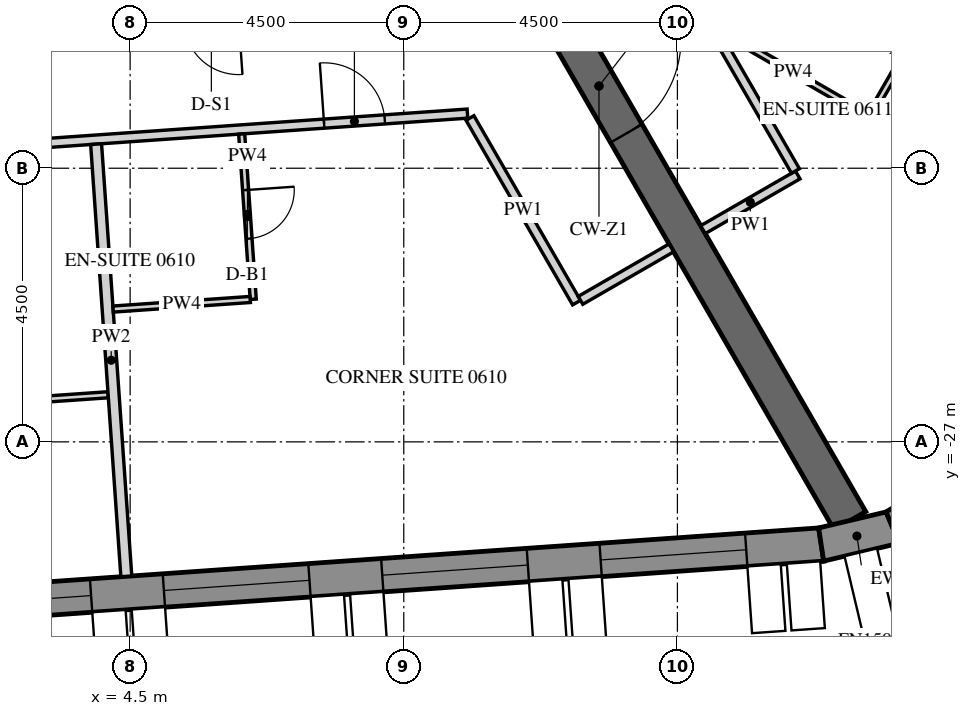
"""IFC4 building model, lengths in metres.
Left out: names, types, materials, properties, quantities, classifications, styles, units other than length and angle.
Written with IfcOpenShell. Run it as: python <this file> out.ifc"""

import sys

from ifc_helpers import new_model, si_unit, direction, frame, frame_2d, origin, place, context, subcontext, project, spatial, polyline, rectangle, outline, extrude, element, fill, save


model = new_model("IFC4")
c1 = context("Model", 3, precision=1e-05, world=origin(), true_north=direction((0.0, 1.0)))
c2 = subcontext(c1, "Body", "Model", "MODEL_VIEW")
j1 = project(units=[si_unit("LENGTHUNIT", "METRE"), si_unit("PLANEANGLEUNIT", "RADIAN")], contexts=[c1])
p1 = place(None, origin())
s1 = spatial("IfcSite", under=j1, at=p1, CompositionType="ELEMENT")
p2 = place(p1, origin())
s2 = spatial("IfcBuilding", under=s1, at=p2, CompositionType="ELEMENT")
p3 = place(p2, frame((0.0, 0.0, 92.1)))
s3 = spatial("IfcBuildingStorey", under=s2, at=p3, CompositionType="ELEMENT", Elevation=92.1)
p4 = place(p3, frame((-14.134, -30.786, -0.15), z_axis=(0.0, 0.0, 1.0), x_axis=(0.997564037441, 0.069756657061, 0.0)))
e1 = element("IfcWall", 1, at=p4, inside=s3, PredefinedType="SOLIDWALL", context=c2, shape_type="SweptSolid", body=[
    extrude(outline(polyline([(-0.026, -0.275), (30.094, -0.275), (30.049, 0.275), (0.026, 0.275), (-0.026, -0.275)])), origin(), (0.0, 0.0, 1.0), 3.9),
])
p5 = place(p4, frame((1.236, 0.0, 1.05)))
e2 = element("IfcOpeningElement", 2, at=p5, cuts=e1, PredefinedType="OPENING", context=c2, shape_type="SweptSolid", body=[
    extrude(rectangle(XDim=2.4, YDim=2.4, at=frame_2d((1.2, 1.2))), frame((0.0, 0.285, 0.0), z_axis=(0.0, -1.0, 0.0), x_axis=(1.0, 0.0, 0.0)), (0.0, 0.0, 1.0), 0.57),
])
p6 = place(p4, frame((4.835, 0.0, 1.05)))
e3 = element("IfcOpeningElement", 3, at=p6, cuts=e1, PredefinedType="OPENING", context=c2, shape_type="SweptSolid", body=[
    extrude(rectangle(XDim=2.4, YDim=2.4, at=frame_2d((1.2, 1.2))), frame((0.0, 0.285, 0.0), z_axis=(0.0, -1.0, 0.0), x_axis=(1.0, 0.0, 0.0)), (0.0, 0.0, 1.0), 0.57),
])
p7 = place(p4, frame((8.436, 0.0, 1.05)))
e4 = element("IfcOpeningElement", 4, at=p7, cuts=e1, PredefinedType="OPENING", context=c2, shape_type="SweptSolid", body=[
    extrude(rectangle(XDim=2.4, YDim=2.4, at=frame_2d((1.2, 1.2))), frame((0.0, 0.285, 0.0), z_axis=(0.0, -1.0, 0.0), x_axis=(1.0, 0.0, 0.0)), (0.0, 0.0, 1.0), 0.57),
])
p8 = place(p4, frame((12.035, 0.0, 1.05)))
e5 = element("IfcOpeningElement", 5, at=p8, cuts=e1, PredefinedType="OPENING", context=c2, shape_type="SweptSolid", body=[
    extrude(rectangle(XDim=2.4, YDim=2.4, at=frame_2d((1.2, 1.2))), frame((0.0, 0.285, 0.0), z_axis=(0.0, -1.0, 0.0), x_axis=(1.0, 0.0, 0.0)), (0.0, 0.0, 1.0), 0.57),
])
p9 = place(p4, frame((15.635, 0.0, 1.05)))
e6 = element("IfcOpeningElement", 6, at=p9, cuts=e1, PredefinedType="OPENING", context=c2, shape_type="SweptSolid", body=[
    extrude(rectangle(XDim=2.4, YDim=2.4, at=frame_2d((1.2, 1.2))), frame((0.0, 0.285, 0.0), z_axis=(0.0, -1.0, 0.0), x_axis=(1.0, 0.0, 0.0)), (0.0, 0.0, 1.0), 0.57),
])
p10 = place(p4, frame((19.236, 0.0, 1.05)))
e7 = element("IfcOpeningElement", 7, at=p10, cuts=e1, PredefinedType="OPENING", context=c2, shape_type="SweptSolid", body=[
    extrude(rectangle(XDim=2.4, YDim=2.4, at=frame_2d((1.2, 1.2))), frame((0.0, 0.285, 0.0), z_axis=(0.0, -1.0, 0.0), x_axis=(1.0, 0.0, 0.0)), (0.0, 0.0, 1.0), 0.57),
])
p11 = place(p4, frame((22.835, 0.0, 1.05)))
e8 = element("IfcOpeningElement", 8, at=p11, cuts=e1, PredefinedType="OPENING", context=c2, shape_type="SweptSolid", body=[
    extrude(rectangle(XDim=2.4, YDim=2.4, at=frame_2d((1.2, 1.2))), frame((0.0, 0.285, 0.0), z_axis=(0.0, -1.0, 0.0), x_axis=(1.0, 0.0, 0.0)), (0.0, 0.0, 1.0), 0.57),
])
p12 = place(p4, frame((26.436, 0.0, 1.05)))
e9 = element("IfcOpeningElement", 9, at=p12, cuts=e1, PredefinedType="OPENING", context=c2, shape_type="SweptSolid", body=[
    extrude(rectangle(XDim=2.4, YDim=2.4, at=frame_2d((1.2, 1.2))), frame((0.0, 0.285, 0.0), z_axis=(0.0, -1.0, 0.0), x_axis=(1.0, 0.0, 0.0)), (0.0, 0.0, 1.0), 0.57),
])
p13 = place(p3, frame((15.864, -28.688, -0.15), z_axis=(0.0, 0.0, 1.0), x_axis=(0.973063591128, 0.230536868247, 0.0)))
e10 = element("IfcWall", 10, at=p13, inside=s3, PredefinedType="SOLIDWALL", context=c2, shape_type="SweptSolid", body=[
    extrude(outline(polyline([(-0.022, -0.275), (1.253, -0.275), (1.163, 0.275), (0.022, 0.275), (-0.022, -0.275)])), origin(), (0.0, 0.0, 1.0), 3.9),
])
p14 = place(p3, frame((17.04, -28.41, -0.15), z_axis=(0.0, 0.0, 1.0), x_axis=(0.847952888306, 0.530071598195, 0.0)))
e11 = element("IfcWall", 11, at=p14, inside=s3, PredefinedType="SOLIDWALL", context=c2, shape_type="SweptSolid", body=[
    extrude(outline(polyline([(-0.045, -0.275), (1.253, -0.275), (1.163, 0.275), (0.045, 0.275), (-0.045, -0.275)])), origin(), (0.0, 0.0, 1.0), 3.9),
])
p15 = place(p3, frame((8.083, -14.0, -0.15), z_axis=(0.0, 0.0, 1.0), x_axis=(0.499997680643, -0.866026742862, 0.0)))
e12 = element("IfcWall", 12, at=p15, inside=s3, PredefinedType="SHEAR", context=c2, shape_type="SweptSolid", body=[
    extrude(rectangle(XDim=16.509, YDim=0.6, at=frame_2d((8.254, 0.0))), origin(), (0.0, 0.0, 1.0), 3.9),
])
p16 = place(p15, frame((7.354, 0.0, 0.15)))
e13 = element("IfcOpeningElement", 13, at=p16, cuts=e12, PredefinedType="OPENING", context=c2, shape_type="SweptSolid", body=[
    extrude(rectangle(XDim=1.8, YDim=2.4, at=frame_2d((0.9, 1.2))), frame((0.0, 0.31, 0.0), z_axis=(0.0, -1.0, 0.0), x_axis=(1.0, 0.0, 0.0)), (0.0, 0.0, 1.0), 0.62),
])
p17 = place(p3, frame((-12.234, -23.16, 0.0), z_axis=(0.0, 0.0, 1.0), x_axis=(0.997563845372, 0.069759403714, 0.0)))
e14 = element("IfcWall", 14, at=p17, inside=s3, PredefinedType="PARTITIONING", context=c2, shape_type="SweptSolid", body=[
    extrude(rectangle(XDim=22.335, YDim=0.15, at=frame_2d((11.168, 0.0))), origin(), (0.0, 0.0, 1.0), 2.988),
])
p18 = place(p17, frame((9.809, 0.0, 0.0)))
e15 = element("IfcOpeningElement", 15, at=p18, cuts=e14, PredefinedType="OPENING", context=c2, shape_type="SweptSolid", body=[
    extrude(rectangle(XDim=1.0, YDim=2.1, at=frame_2d((0.5, 1.05))), frame((0.0, 0.085, 0.0), z_axis=(0.0, -1.0, 0.0), x_axis=(1.0, 0.0, 0.0)), (0.0, 0.0, 1.0), 0.17),
])
p19 = place(p17, frame((19.972, 0.0, 0.0)))
e16 = element("IfcOpeningElement", 16, at=p19, cuts=e14, PredefinedType="OPENING", context=c2, shape_type="SweptSolid", body=[
    extrude(rectangle(XDim=1.0, YDim=2.1, at=frame_2d((0.5, 1.05))), frame((0.0, 0.085, 0.0), z_axis=(0.0, -1.0, 0.0), x_axis=(1.0, 0.0, 0.0)), (0.0, 0.0, 1.0), 0.17),
])
p20 = place(p3, frame((10.089, -21.674, 0.0), z_axis=(0.0, 0.0, 1.0), x_axis=(0.500003763204, -0.866023231087, 0.0)))
e17 = element("IfcWall", 17, at=p20, inside=s3, PredefinedType="PARTITIONING", context=c2, shape_type="SweptSolid", body=[
    extrude(rectangle(XDim=3.506, YDim=0.15, at=frame_2d((1.753, 0.0))), origin(), (0.0, 0.0, 1.0), 2.988),
])
p21 = place(p3, frame((11.906, -24.673, 0.0), z_axis=(0.0, 0.0, 1.0), x_axis=(0.866013532718, 0.500020560727, 0.0)))
e18 = element("IfcWall", 18, at=p21, inside=s3, PredefinedType="PARTITIONING", context=c2, shape_type="SweptSolid", body=[
    extrude(rectangle(XDim=1.725, YDim=0.15, at=frame_2d((0.863, 0.0))), origin(), (0.0, 0.0, 1.0), 2.988),
])
p22 = place(p3, frame((13.92, -23.51, 0.0), z_axis=(0.0, 0.0, 1.0), x_axis=(0.866047807691, 0.499961193289, 0.0)))
e19 = element("IfcWall", 19, at=p22, inside=s3, PredefinedType="PARTITIONING", context=c2, shape_type="SweptSolid", body=[
    extrude(rectangle(XDim=1.8, YDim=0.15, at=frame_2d((0.9, 0.0))), origin(), (0.0, 0.0, 1.0), 2.988),
])
p23 = place(p3, frame((15.441, -22.545, 0.0), z_axis=(0.0, 0.0, 1.0), x_axis=(-0.499974611044, 0.866040061609, 0.0)))
e20 = element("IfcWall", 20, at=p23, inside=s3, PredefinedType="PARTITIONING", context=c2, shape_type="SweptSolid", body=[
    extrude(rectangle(XDim=2.766, YDim=0.15, at=frame_2d((1.383, 0.0))), origin(), (0.0, 0.0, 1.0), 2.988),
])
p24 = place(p3, frame((-2.905, -26.718, 0.0), z_axis=(0.0, 0.0, 1.0), x_axis=(0.997562242002, 0.069782328216, 0.0)))
e21 = element("IfcWall", 21, at=p24, inside=s3, PredefinedType="PARTITIONING", context=c2, shape_type="SweptSolid", body=[
    extrude(rectangle(XDim=7.06, YDim=0.1, at=frame_2d((3.53, 0.0))), origin(), (0.0, 0.0, 1.0), 2.988),
])
p25 = place(p24, frame((3.1, 0.0, 0.0)))
e22 = element("IfcOpeningElement", 22, at=p25, cuts=e21, PredefinedType="OPENING", context=c2, shape_type="SweptSolid", body=[
    extrude(rectangle(XDim=0.9, YDim=2.1, at=frame_2d((0.45, 1.05))), frame((0.0, 0.06, 0.0), z_axis=(0.0, -1.0, 0.0), x_axis=(1.0, 0.0, 0.0)), (0.0, 0.0, 1.0), 0.12),
])
p26 = place(p3, frame((4.438, -29.212, 0.0), z_axis=(0.0, 0.0, 1.0), x_axis=(-0.069764000094, 0.997563523938, 0.0)))
e23 = element("IfcWall", 23, at=p26, inside=s3, PredefinedType="PARTITIONING", context=c2, shape_type="SweptSolid", body=[
    extrude(rectangle(XDim=7.125, YDim=0.18, at=frame_2d((3.562, 0.0))), origin(), (0.0, 0.0, 1.0), 2.988),
])
p27 = place(p3, frame((6.334, -21.937, 0.0), z_axis=(0.0, 0.0, 1.0), x_axis=(0.069789009646, -0.997561774595, 0.0)))
e24 = element("IfcWall", 24, at=p27, inside=s3, PredefinedType="PARTITIONING", context=c2, shape_type="SweptSolid", body=[
    extrude(rectangle(XDim=2.725, YDim=0.1, at=frame_2d((1.363, 0.0))), origin(), (0.0, 0.0, 1.0), 2.988),
])
p28 = place(p27, frame((0.925, 0.0, 0.0)))
e25 = element("IfcOpeningElement", 25, at=p28, cuts=e24, PredefinedType="OPENING", context=c2, shape_type="SweptSolid", body=[
    extrude(rectangle(XDim=0.8, YDim=2.1, at=frame_2d((0.4, 1.05))), frame((0.0, 0.06, 0.0), z_axis=(0.0, -1.0, 0.0), x_axis=(1.0, 0.0, 0.0)), (0.0, 0.0, 1.0), 0.12),
])
p29 = place(p3, frame((6.475, -24.658, 0.0), z_axis=(0.0, 0.0, 1.0), x_axis=(-0.997562351999, -0.069780755754, 0.0)))
e26 = element("IfcWall", 26, at=p29, inside=s3, PredefinedType="PARTITIONING", context=c2, shape_type="SweptSolid", body=[
    extrude(rectangle(XDim=2.26, YDim=0.1, at=frame_2d((1.13, 0.0))), origin(), (0.0, 0.0, 1.0), 2.988),
])
p30 = place(p3, frame((17.932, -19.442, 0.0), z_axis=(0.0, 0.0, 1.0), x_axis=(-0.500062241894, -0.865989465428, 0.0)))
e27 = element("IfcWall", 27, at=p30, inside=s3, PredefinedType="PARTITIONING", context=c2, shape_type="SweptSolid", body=[
    extrude(rectangle(XDim=2.55, YDim=0.1, at=frame_2d((1.275, 0.0))), origin(), (0.0, 0.0, 1.0), 2.988),
])
p31 = place(p3, frame((16.613, -21.625, 0.0), z_axis=(0.0, 0.0, 1.0), x_axis=(-0.866034573852, 0.49998411664, 0.0)))
e28 = element("IfcWall", 28, at=p31, inside=s3, PredefinedType="PARTITIONING", context=c2, shape_type="SweptSolid", body=[
    extrude(rectangle(XDim=2.8, YDim=0.1, at=frame_2d((1.4, 0.0))), origin(), (0.0, 0.0, 1.0), 2.988),
])
p32 = place(p9, frame((0.0, 0.205, 0.0)))
e29 = element("IfcWindow", 29, at=p32, inside=s3, PartitioningType="DOUBLE_PANEL_VERTICAL", PredefinedType="WINDOW", context=c2, shape_type="SweptSolid", body=[
    extrude(rectangle(XDim=2.4, YDim=2.4, at=frame_2d((1.2, 1.2))), frame((0.0, 0.03, 0.0), z_axis=(0.0, -1.0, 0.0), x_axis=(1.0, 0.0, 0.0)), (0.0, 0.0, 1.0), 0.06),
])
fill(e6, e29)
p33 = place(p10, frame((0.0, 0.205, 0.0)))
e30 = element("IfcWindow", 30, at=p33, inside=s3, PartitioningType="DOUBLE_PANEL_VERTICAL", PredefinedType="WINDOW", context=c2, shape_type="SweptSolid", body=[
    extrude(rectangle(XDim=2.4, YDim=2.4, at=frame_2d((1.2, 1.2))), frame((0.0, 0.03, 0.0), z_axis=(0.0, -1.0, 0.0), x_axis=(1.0, 0.0, 0.0)), (0.0, 0.0, 1.0), 0.06),
])
fill(e7, e30)
p34 = place(p11, frame((0.0, 0.205, 0.0)))
e31 = element("IfcWindow", 31, at=p34, inside=s3, PartitioningType="DOUBLE_PANEL_VERTICAL", PredefinedType="WINDOW", context=c2, shape_type="SweptSolid", body=[
    extrude(rectangle(XDim=2.4, YDim=2.4, at=frame_2d((1.2, 1.2))), frame((0.0, 0.03, 0.0), z_axis=(0.0, -1.0, 0.0), x_axis=(1.0, 0.0, 0.0)), (0.0, 0.0, 1.0), 0.06),
])
fill(e8, e31)
p35 = place(p12, frame((0.0, 0.205, 0.0)))
e32 = element("IfcWindow", 32, at=p35, inside=s3, PartitioningType="DOUBLE_PANEL_VERTICAL", PredefinedType="WINDOW", context=c2, shape_type="SweptSolid", body=[
    extrude(rectangle(XDim=2.4, YDim=2.4, at=frame_2d((1.2, 1.2))), frame((0.0, 0.03, 0.0), z_axis=(0.0, -1.0, 0.0), x_axis=(1.0, 0.0, 0.0)), (0.0, 0.0, 1.0), 0.06),
])
fill(e9, e32)
p36 = place(p16, origin())
e33 = element("IfcDoor", 33, at=p36, inside=s3, OperationType="DOUBLE_DOOR_SINGLE_SWING", PredefinedType="DOOR", context=c2, shape_type="SweptSolid", body=[
    extrude(rectangle(XDim=1.8, YDim=2.4, at=frame_2d((0.9, 1.2))), frame((0.0, 0.025, 0.0), z_axis=(0.0, -1.0, 0.0), x_axis=(1.0, 0.0, 0.0)), (0.0, 0.0, 1.0), 0.05),
])
fill(e13, e33)
p37 = place(p19, origin())
e34 = element("IfcDoor", 34, at=p37, inside=s3, OperationType="SINGLE_SWING_LEFT", PredefinedType="DOOR", context=c2, shape_type="SweptSolid", body=[
    extrude(rectangle(XDim=1.0, YDim=2.1, at=frame_2d((0.5, 1.05))), frame((0.0, 0.025, 0.0), z_axis=(0.0, -1.0, 0.0), x_axis=(1.0, 0.0, 0.0)), (0.0, 0.0, 1.0), 0.05),
])
fill(e16, e34)
p38 = place(p28, origin())
e35 = element("IfcDoor", 35, at=p38, inside=s3, OperationType="SINGLE_SWING_RIGHT", PredefinedType="DOOR", context=c2, shape_type="SweptSolid", body=[
    extrude(rectangle(XDim=0.8, YDim=2.1, at=frame_2d((0.4, 1.05))), frame((0.0, 0.025, 0.0), z_axis=(0.0, -1.0, 0.0), x_axis=(1.0, 0.0, 0.0)), (0.0, 0.0, 1.0), 0.05),
])
fill(e25, e35)
save(model, sys.argv[1])
